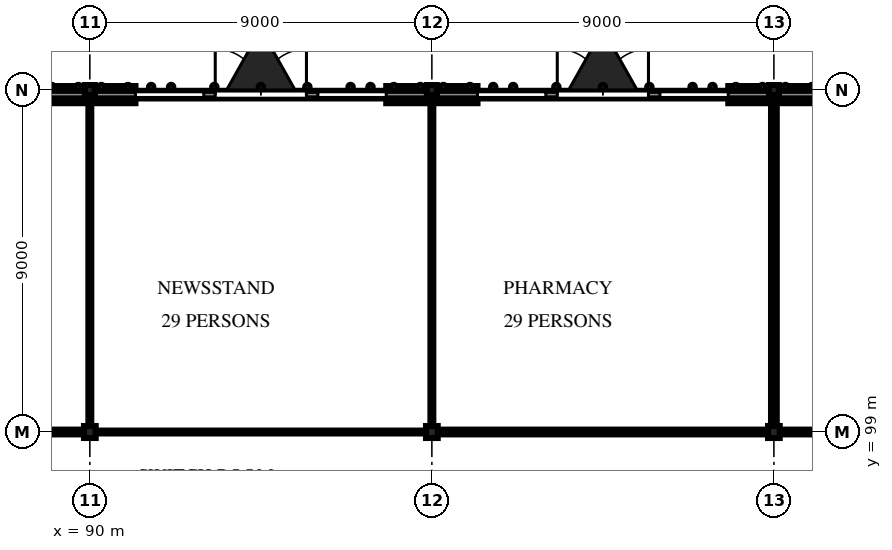
"""IFC4 building model, lengths in metres.
Left out: names, types, materials, properties, quantities, classifications, styles, units other than length and angle.
Written with IfcOpenShell. Run it as: python <this file> out.ifc"""

import sys

from ifc_helpers import new_model, si_unit, direction, frame, frame_2d, origin, origin_2d, place, context, subcontext, project, spatial, polyline, rectangle, i_section, outline, extrude, element, fill, save


model = new_model("IFC4")
c1 = context("Model", 3, precision=1e-05, world=origin(), true_north=direction((0.0, 1.0)))
c2 = subcontext(c1, "Body", "Model", "MODEL_VIEW")
j1 = project(units=[si_unit("LENGTHUNIT", "METRE"), si_unit("PLANEANGLEUNIT", "RADIAN")], contexts=[c1])
p1 = place(None, origin())
s1 = spatial("IfcSite", under=j1, at=p1, CompositionType="ELEMENT")
p2 = place(p1, origin())
s2 = spatial("IfcBuilding", under=s1, at=p2, CompositionType="ELEMENT")
p3 = place(p2, origin())
s3 = spatial("IfcBuildingStorey", under=s2, at=p3, CompositionType="ELEMENT", Elevation=0.0)
p4 = place(p3, frame((90.0, 99.0, -2.1), z_axis=(0.0, 0.0, 1.0), x_axis=(1.0, 0.0, 0.0)))
e1 = element("IfcColumn", 1, at=p4, inside=s3, PredefinedType="COLUMN", context=c2, shape_type="SweptSolid", body=[
    extrude(i_section(OverallWidth=0.307, OverallDepth=0.314, WebThickness=0.012, FlangeThickness=0.019, FilletRadius=0.015, at=origin_2d()), origin(), (0.0, 0.0, 1.0), 9.6),
])
p5 = place(p3, frame((90.0, 108.0, -2.1), z_axis=(0.0, 0.0, 1.0), x_axis=(1.0, 0.0, 0.0)))
e2 = element("IfcColumn", 2, at=p5, inside=s3, PredefinedType="COLUMN", context=c2, shape_type="SweptSolid", body=[
    extrude(i_section(OverallWidth=0.256, OverallDepth=0.26, WebThickness=0.01, FlangeThickness=0.017, FilletRadius=0.013, at=origin_2d()), origin(), (0.0, 0.0, 1.0), 9.6),
])
p6 = place(p3, frame((99.0, 99.0, -2.1), z_axis=(0.0, 0.0, 1.0), x_axis=(1.0, 0.0, 0.0)))
e3 = element("IfcColumn", 3, at=p6, inside=s3, PredefinedType="COLUMN", context=c2, shape_type="SweptSolid", body=[
    extrude(i_section(OverallWidth=0.307, OverallDepth=0.314, WebThickness=0.012, FlangeThickness=0.019, FilletRadius=0.015, at=origin_2d()), origin(), (0.0, 0.0, 1.0), 9.6),
])
p7 = place(p3, frame((99.0, 108.0, -2.1), z_axis=(0.0, 0.0, 1.0), x_axis=(1.0, 0.0, 0.0)))
e4 = element("IfcColumn", 4, at=p7, inside=s3, PredefinedType="COLUMN", context=c2, shape_type="SweptSolid", body=[
    extrude(i_section(OverallWidth=0.256, OverallDepth=0.26, WebThickness=0.01, FlangeThickness=0.017, FilletRadius=0.013, at=origin_2d()), origin(), (0.0, 0.0, 1.0), 9.6),
])
p8 = place(p3, frame((108.0, 99.0, -2.1), z_axis=(0.0, 0.0, 1.0), x_axis=(1.0, 0.0, 0.0)))
e5 = element("IfcColumn", 5, at=p8, inside=s3, PredefinedType="COLUMN", context=c2, shape_type="SweptSolid", body=[
    extrude(i_section(OverallWidth=0.307, OverallDepth=0.314, WebThickness=0.012, FlangeThickness=0.019, FilletRadius=0.015, at=origin_2d()), origin(), (0.0, 0.0, 1.0), 9.6),
])
p9 = place(p3, frame((108.0, 108.0, -2.1), z_axis=(0.0, 0.0, 1.0), x_axis=(1.0, 0.0, 0.0)))
e6 = element("IfcColumn", 6, at=p9, inside=s3, PredefinedType="COLUMN", context=c2, shape_type="SweptSolid", body=[
    extrude(i_section(OverallWidth=0.256, OverallDepth=0.26, WebThickness=0.01, FlangeThickness=0.017, FilletRadius=0.013, at=origin_2d()), origin(), (0.0, 0.0, 1.0), 9.6),
])
p10 = place(p3, frame((88.8, 107.878, 0.0), z_axis=(0.0, 0.0, 1.0), x_axis=(1.0, 0.0, 0.0)))
e7 = element("IfcWall", 7, at=p10, inside=s3, PredefinedType="SOLIDWALL", context=c2, shape_type="SweptSolid", body=[
    extrude(rectangle(XDim=1.072, YDim=0.45, at=frame_2d((0.536, 0.0))), origin(), (0.0, 0.0, 1.0), 4.5),
])
p11 = place(p3, frame((81.128, 107.878, 4.9), z_axis=(0.0, 0.0, 1.0), x_axis=(1.0, 0.0, 0.0)))
e8 = element("IfcWall", 8, at=p11, inside=s3, PredefinedType="SOLIDWALL", context=c2, shape_type="SweptSolid", body=[
    extrude(rectangle(XDim=8.744, YDim=0.2, at=frame_2d((4.372, 0.0))), origin(), (0.0, 0.0, 1.0), 1.792),
])
p12 = place(p3, frame((90.128, 107.878, 0.0), z_axis=(0.0, 0.0, 1.0), x_axis=(1.0, 0.0, 0.0)))
e9 = element("IfcWall", 9, at=p12, inside=s3, PredefinedType="SOLIDWALL", context=c2, shape_type="SweptSolid", body=[
    extrude(rectangle(XDim=1.072, YDim=0.45, at=frame_2d((0.536, 0.0))), origin(), (0.0, 0.0, 1.0), 4.5),
])
p13 = place(p3, frame((93.0, 107.878, 0.0), z_axis=(0.0, 0.0, 1.0), x_axis=(1.0, 0.0, 0.0)))
e10 = element("IfcWall", 10, at=p13, inside=s3, PredefinedType="ELEMENTEDWALL", context=c2, shape_type="SweptSolid", body=[
    extrude(rectangle(XDim=3.0, YDim=0.15, at=frame_2d((1.5, 0.0))), origin(), (0.0, 0.0, 1.0), 4.5),
])
p14 = place(p13, frame((0.3, 0.0, 0.0)))
e11 = element("IfcOpeningElement", 11, at=p14, cuts=e10, PredefinedType="OPENING", context=c2, shape_type="SweptSolid", body=[
    extrude(rectangle(XDim=2.4, YDim=2.7, at=frame_2d((1.2, 1.35))), frame((0.0, 0.085, 0.0), z_axis=(0.0, -1.0, 0.0), x_axis=(1.0, 0.0, 0.0)), (0.0, 0.0, 1.0), 0.17),
])
p15 = place(p3, frame((97.8, 107.878, 0.0), z_axis=(0.0, 0.0, 1.0), x_axis=(1.0, 0.0, 0.0)))
e12 = element("IfcWall", 12, at=p15, inside=s3, PredefinedType="SOLIDWALL", context=c2, shape_type="SweptSolid", body=[
    extrude(rectangle(XDim=1.072, YDim=0.45, at=frame_2d((0.536, 0.0))), origin(), (0.0, 0.0, 1.0), 4.5),
])
p16 = place(p3, frame((90.128, 107.878, 4.9), z_axis=(0.0, 0.0, 1.0), x_axis=(1.0, 0.0, 0.0)))
e13 = element("IfcWall", 13, at=p16, inside=s3, PredefinedType="SOLIDWALL", context=c2, shape_type="SweptSolid", body=[
    extrude(rectangle(XDim=8.744, YDim=0.2, at=frame_2d((4.372, 0.0))), origin(), (0.0, 0.0, 1.0), 1.792),
])
p17 = place(p3, frame((99.128, 107.878, 0.0), z_axis=(0.0, 0.0, 1.0), x_axis=(1.0, 0.0, 0.0)))
e14 = element("IfcWall", 14, at=p17, inside=s3, PredefinedType="SOLIDWALL", context=c2, shape_type="SweptSolid", body=[
    extrude(rectangle(XDim=1.072, YDim=0.45, at=frame_2d((0.536, 0.0))), origin(), (0.0, 0.0, 1.0), 4.5),
])
p18 = place(p3, frame((102.0, 107.878, 0.0), z_axis=(0.0, 0.0, 1.0), x_axis=(1.0, 0.0, 0.0)))
e15 = element("IfcWall", 15, at=p18, inside=s3, PredefinedType="ELEMENTEDWALL", context=c2, shape_type="SweptSolid", body=[
    extrude(rectangle(XDim=3.0, YDim=0.15, at=frame_2d((1.5, 0.0))), origin(), (0.0, 0.0, 1.0), 4.5),
])
p19 = place(p18, frame((0.3, 0.0, 0.0)))
e16 = element("IfcOpeningElement", 16, at=p19, cuts=e15, PredefinedType="OPENING", context=c2, shape_type="SweptSolid", body=[
    extrude(rectangle(XDim=2.4, YDim=2.7, at=frame_2d((1.2, 1.35))), frame((0.0, 0.085, 0.0), z_axis=(0.0, -1.0, 0.0), x_axis=(1.0, 0.0, 0.0)), (0.0, 0.0, 1.0), 0.17),
])
p20 = place(p3, frame((106.8, 107.878, 0.0), z_axis=(0.0, 0.0, 1.0), x_axis=(1.0, 0.0, 0.0)))
e17 = element("IfcWall", 17, at=p20, inside=s3, PredefinedType="SOLIDWALL", context=c2, shape_type="SweptSolid", body=[
    extrude(rectangle(XDim=1.072, YDim=0.45, at=frame_2d((0.536, 0.0))), origin(), (0.0, 0.0, 1.0), 4.5),
])
p21 = place(p3, frame((99.128, 107.878, 4.9), z_axis=(0.0, 0.0, 1.0), x_axis=(1.0, 0.0, 0.0)))
e18 = element("IfcWall", 18, at=p21, inside=s3, PredefinedType="SOLIDWALL", context=c2, shape_type="SweptSolid", body=[
    extrude(rectangle(XDim=8.744, YDim=0.2, at=frame_2d((4.372, 0.0))), origin(), (0.0, 0.0, 1.0), 1.792),
])
p22 = place(p3, frame((108.128, 107.878, 0.0), z_axis=(0.0, 0.0, 1.0), x_axis=(1.0, 0.0, 0.0)))
e19 = element("IfcWall", 19, at=p22, inside=s3, PredefinedType="SOLIDWALL", context=c2, shape_type="SweptSolid", body=[
    extrude(rectangle(XDim=1.072, YDim=0.45, at=frame_2d((0.536, 0.0))), origin(), (0.0, 0.0, 1.0), 4.5),
])
p23 = place(p3, frame((108.128, 107.878, 4.9), z_axis=(0.0, 0.0, 1.0), x_axis=(1.0, 0.0, 0.0)))
e20 = element("IfcWall", 20, at=p23, inside=s3, PredefinedType="SOLIDWALL", context=c2, shape_type="SweptSolid", body=[
    extrude(rectangle(XDim=8.744, YDim=0.2, at=frame_2d((4.372, 0.0))), origin(), (0.0, 0.0, 1.0), 1.792),
])
for number, where, z_axis, x_axis in (
    (21, (108.154, 99.0, 0.0), (0.0, 0.0, 1.0), (1.0, 0.0, 0.0)),
    (22, (99.154, 99.0, 0.0), (0.0, 0.0, 1.0), (1.0, 0.0, 0.0)),
):
    element("IfcWall", number, at=place(p3, frame(where, z_axis=z_axis, x_axis=x_axis)), inside=s3, PredefinedType="PARTITIONING", context=c2, shape_type="SweptSolid", body=[
        extrude(rectangle(XDim=8.692, YDim=0.125, at=frame_2d((4.346, 0.0))), origin(), (0.0, 0.0, 1.0), 6.757),
    ])
p24 = place(p3, frame((90.154, 99.0, 0.0), z_axis=(0.0, 0.0, 1.0), x_axis=(1.0, 0.0, 0.0)))
e23 = element("IfcWall", 23, at=p24, inside=s3, PredefinedType="PARTITIONING", context=c2, shape_type="SweptSolid", body=[
    extrude(rectangle(XDim=8.692, YDim=0.075, at=frame_2d((4.346, 0.0))), origin(), (0.0, 0.0, 1.0), 6.692),
])
p25 = place(p3, frame((81.154, 99.0, 0.0), z_axis=(0.0, 0.0, 1.0), x_axis=(1.0, 0.0, 0.0)))
e24 = element("IfcWall", 24, at=p25, inside=s3, PredefinedType="PARTITIONING", context=c2, shape_type="SweptSolid", body=[
    extrude(rectangle(XDim=8.692, YDim=0.125, at=frame_2d((4.346, 0.0))), origin(), (0.0, 0.0, 1.0), 6.757),
])
for number, where, z_axis, x_axis in (
    (25, (90.0, 107.87, 0.0), (0.0, 0.0, 1.0), (0.0, -1.0, 0.0)),
    (26, (99.0, 107.87, 0.0), (0.0, 0.0, 1.0), (0.0, -1.0, 0.0)),
):
    element("IfcWall", number, at=place(p3, frame(where, z_axis=z_axis, x_axis=x_axis)), inside=s3, PredefinedType="PARTITIONING", context=c2, shape_type="SweptSolid", body=[
        extrude(rectangle(XDim=8.713, YDim=0.075, at=frame_2d((4.356, 0.0))), origin(), (0.0, 0.0, 1.0), 6.692),
    ])
p26 = place(p3, frame((108.0, 107.87, 0.0), z_axis=(0.0, 0.0, 1.0), x_axis=(0.0, -1.0, 0.0)))
e27 = element("IfcWall", 27, at=p26, inside=s3, PredefinedType="PARTITIONING", context=c2, shape_type="SweptSolid", body=[
    extrude(rectangle(XDim=8.713, YDim=0.15, at=frame_2d((4.356, 0.0))), origin(), (0.0, 0.0, 1.0), 6.6),
])
p27 = place(p14, origin())
e28 = element("IfcDoor", 28, at=p27, inside=s3, OperationType="DOUBLE_DOOR_SINGLE_SWING", PredefinedType="DOOR", context=c2, shape_type="SweptSolid", body=[
    extrude(outline(polyline([(0.0, 0.0), (0.07, 0.0), (0.07, 2.63), (2.33, 2.63), (2.33, 0.0), (2.4, 0.0), (2.4, 2.7), (0.0, 2.7), (0.0, 0.0)])), frame((0.0, 0.025, 0.0), z_axis=(0.0, -1.0, 0.0), x_axis=(1.0, 0.0, 0.0)), (0.0, 0.0, 1.0), 0.05),
    extrude(outline(polyline([(0.074, 0.01), (1.197, 0.01), (1.197, 2.626), (0.074, 2.626), (0.074, 0.01)]), holes=[polyline([(0.164, 0.31), (1.107, 0.31), (1.107, 2.536), (0.164, 2.536), (0.164, 0.31)])]), frame((0.0, 0.017, 0.0), z_axis=(0.0, -1.0, 0.0), x_axis=(1.0, 0.0, 0.0)), (0.0, 0.0, 1.0), 0.035),
    extrude(rectangle(XDim=0.943, YDim=2.226, at=frame_2d((0.635, 1.423))), frame((0.0, 0.006, 0.0), z_axis=(0.0, -1.0, 0.0), x_axis=(1.0, 0.0, 0.0)), (0.0, 0.0, 1.0), 0.012),
    extrude(outline(polyline([(1.203, 0.01), (2.326, 0.01), (2.326, 2.626), (1.203, 2.626), (1.203, 0.01)]), holes=[polyline([(1.293, 0.31), (2.236, 0.31), (2.236, 2.536), (1.293, 2.536), (1.293, 0.31)])]), frame((0.0, 0.017, 0.0), z_axis=(0.0, -1.0, 0.0), x_axis=(1.0, 0.0, 0.0)), (0.0, 0.0, 1.0), 0.035),
    extrude(rectangle(XDim=0.943, YDim=2.226, at=frame_2d((1.764, 1.423))), frame((0.0, 0.006, 0.0), z_axis=(0.0, -1.0, 0.0), x_axis=(1.0, 0.0, 0.0)), (0.0, 0.0, 1.0), 0.012),
])
fill(e11, e28)
p28 = place(p19, origin())
e29 = element("IfcDoor", 29, at=p28, inside=s3, OperationType="DOUBLE_DOOR_SINGLE_SWING", PredefinedType="DOOR", context=c2, shape_type="SweptSolid", body=[
    extrude(outline(polyline([(0.0, 0.0), (0.07, 0.0), (0.07, 2.63), (2.33, 2.63), (2.33, 0.0), (2.4, 0.0), (2.4, 2.7), (0.0, 2.7), (0.0, 0.0)])), frame((0.0, 0.025, 0.0), z_axis=(0.0, -1.0, 0.0), x_axis=(1.0, 0.0, 0.0)), (0.0, 0.0, 1.0), 0.05),
    extrude(outline(polyline([(0.074, 0.01), (1.197, 0.01), (1.197, 2.626), (0.074, 2.626), (0.074, 0.01)]), holes=[polyline([(0.164, 0.31), (1.107, 0.31), (1.107, 2.536), (0.164, 2.536), (0.164, 0.31)])]), frame((0.0, 0.017, 0.0), z_axis=(0.0, -1.0, 0.0), x_axis=(1.0, 0.0, 0.0)), (0.0, 0.0, 1.0), 0.035),
    extrude(rectangle(XDim=0.943, YDim=2.226, at=frame_2d((0.635, 1.423))), frame((0.0, 0.006, 0.0), z_axis=(0.0, -1.0, 0.0), x_axis=(1.0, 0.0, 0.0)), (0.0, 0.0, 1.0), 0.012),
    extrude(outline(polyline([(1.203, 0.01), (2.326, 0.01), (2.326, 2.626), (1.203, 2.626), (1.203, 0.01)]), holes=[polyline([(1.293, 0.31), (2.236, 0.31), (2.236, 2.536), (1.293, 2.536), (1.293, 0.31)])]), frame((0.0, 0.017, 0.0), z_axis=(0.0, -1.0, 0.0), x_axis=(1.0, 0.0, 0.0)), (0.0, 0.0, 1.0), 0.035),
    extrude(rectangle(XDim=0.943, YDim=2.226, at=frame_2d((1.764, 1.423))), frame((0.0, 0.006, 0.0), z_axis=(0.0, -1.0, 0.0), x_axis=(1.0, 0.0, 0.0)), (0.0, 0.0, 1.0), 0.012),
])
fill(e16, e29)
save(model, sys.argv[1])
